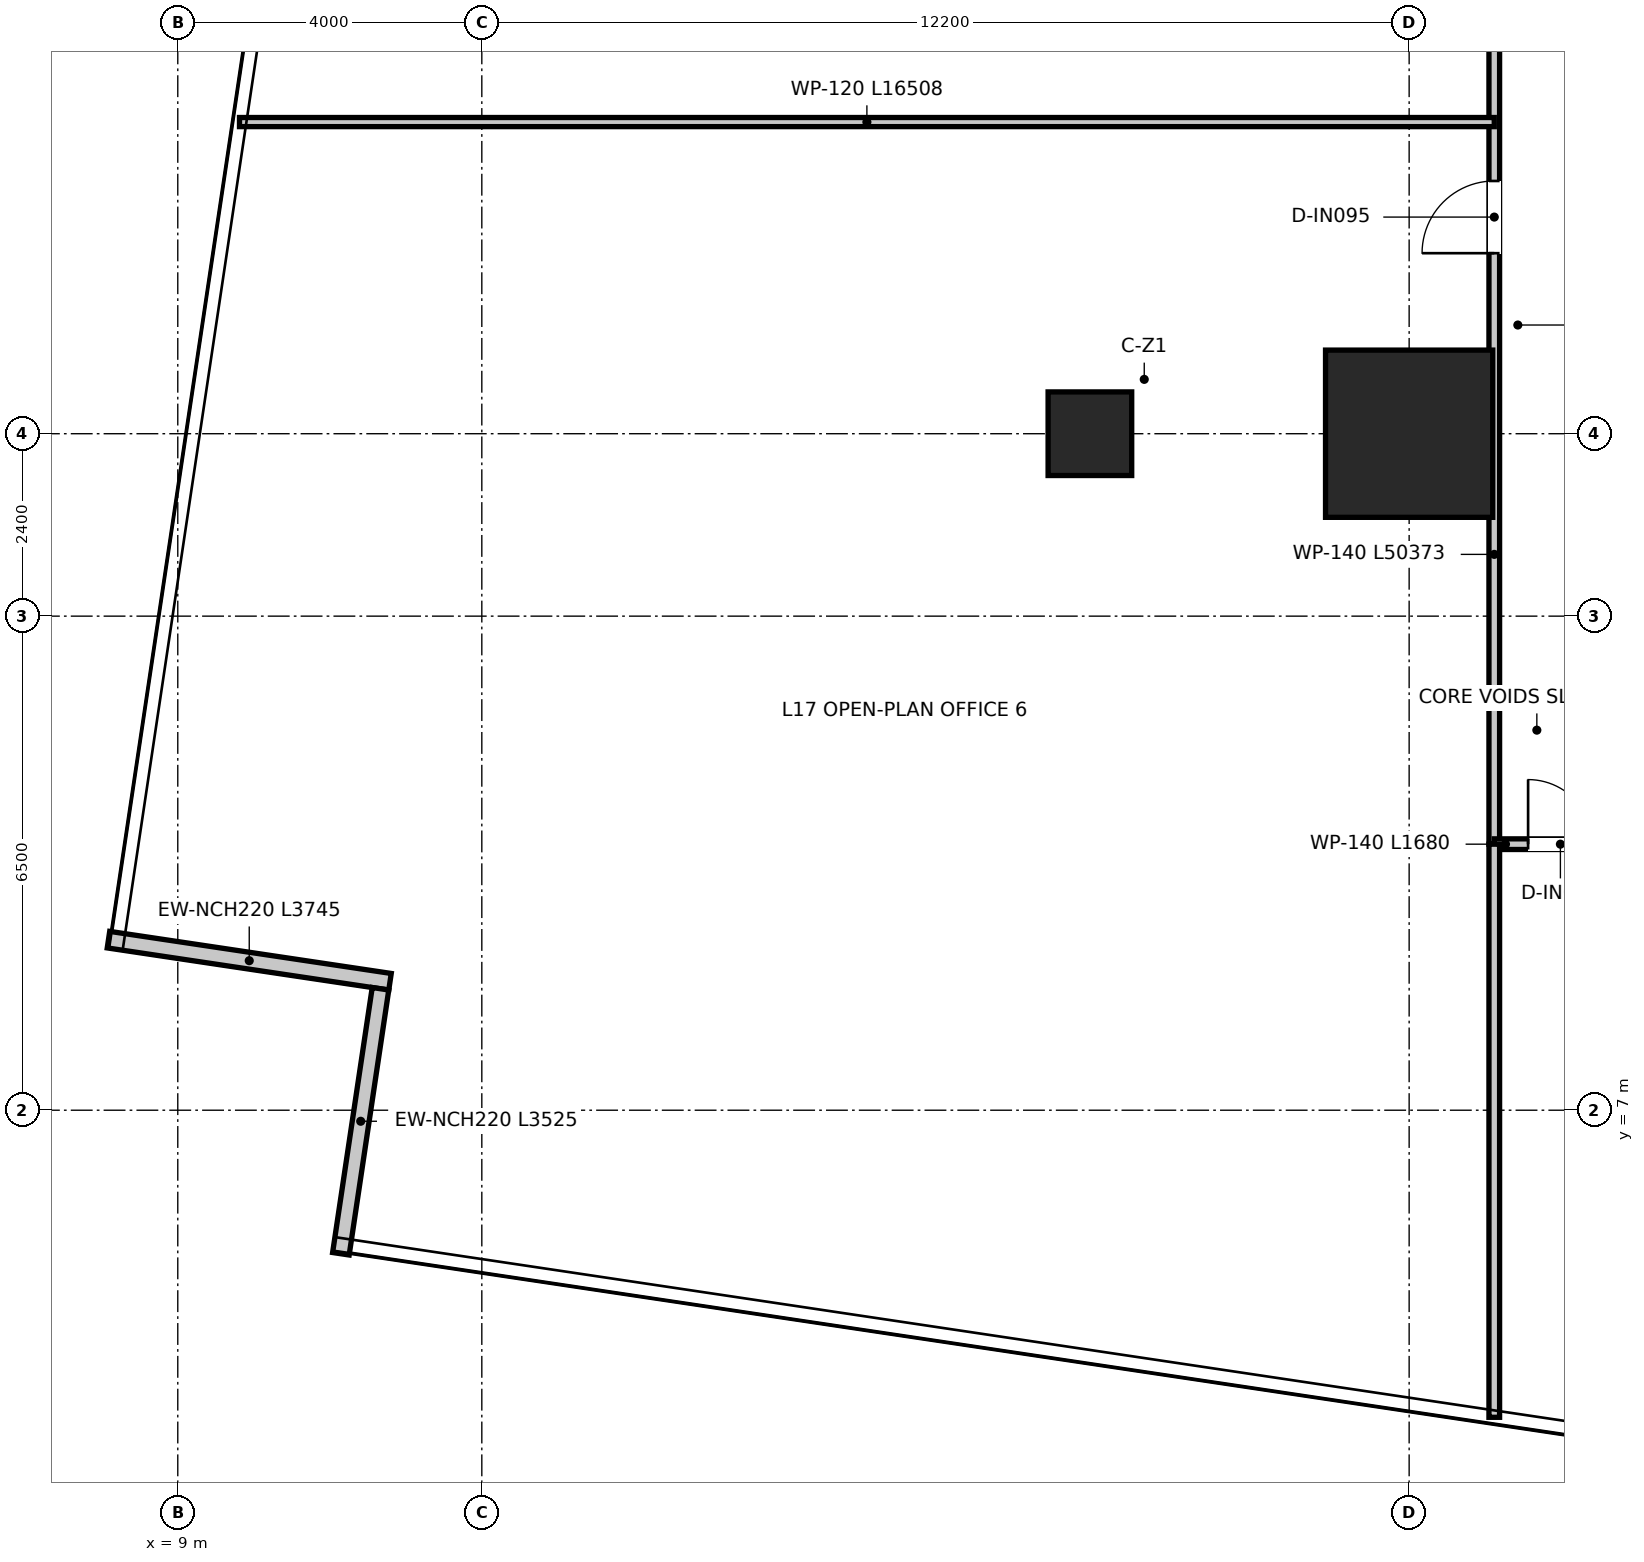
"""IFC4 building model, lengths in metres.
Left out: names, types, materials, properties, quantities, classifications, styles, units other than length and angle.
Written with IfcOpenShell. Run it as: python <this file> out.ifc"""

import sys

from ifc_helpers import new_model, si_unit, direction, frame, frame_2d, origin, origin_2d, place, context, subcontext, project, spatial, rectangle, extrude, source, transform, mapped, element, fill, save


model = new_model("IFC4")
c1 = context("Model", 3, precision=1e-05, world=origin(), true_north=direction((0.0, 1.0)))
c2 = subcontext(c1, "Body", "Model", "MODEL_VIEW")
j1 = project(units=[si_unit("LENGTHUNIT", "METRE"), si_unit("PLANEANGLEUNIT", "RADIAN")], contexts=[c1])
p1 = place(None, origin())
s1 = spatial("IfcSite", under=j1, at=p1, CompositionType="ELEMENT")
p2 = place(p1, origin())
s2 = spatial("IfcBuilding", under=s1, at=p2, CompositionType="ELEMENT")
p3 = place(p2, frame((0.0, 0.0, 72.4)))
s3 = spatial("IfcBuildingStorey", under=s2, at=p3, CompositionType="ELEMENT", Elevation=72.4)
m1 = source(origin(), c2, "Body", "SweptSolid", [
    extrude(rectangle(XDim=2.2, YDim=2.2, at=origin_2d()), origin(), (0.0, 0.0, 1.0), 3.95),
])
p4 = place(p3, frame((25.2, 15.9, 0.0), z_axis=(0.0, 0.0, 1.0), x_axis=(1.0, 0.0, 0.0)))
e1 = element("IfcColumn", 1, at=p4, inside=s3, PredefinedType="USERDEFINED", context=c2, shape_type="MappedRepresentation", body=[
    mapped(m1, transform((0.0, 0.0, 0.0), x_axis=(1.0, 0.0, 0.0), y_axis=(0.0, 1.0, 0.0), z_axis=(0.0, 0.0, 1.0), scale=1.0)),
])
m2 = source(origin(), c2, "Body", "SweptSolid", [
    extrude(rectangle(XDim=1.1, YDim=1.1, at=origin_2d()), origin(), (0.0, 0.0, 1.0), 3.95),
])
p5 = place(p3, frame((21.0, 15.9, 0.0), z_axis=(0.0, 0.0, 1.0), x_axis=(1.0, 0.0, 0.0)))
e2 = element("IfcColumn", 2, at=p5, inside=s3, PredefinedType="COLUMN", context=c2, shape_type="MappedRepresentation", body=[
    mapped(m2, transform((0.0, 0.0, 0.0), x_axis=(1.0, 0.0, 0.0), y_axis=(0.0, 1.0, 0.0), z_axis=(0.0, 0.0, 1.0), scale=1.0)),
])
p6 = place(p3, frame((8.088, 9.244, 0.0), z_axis=(0.0, 0.0, 1.0), x_axis=(0.989018923648, -0.147788932826, 0.0)))
e3 = element("IfcWall", 3, at=p6, inside=s3, PredefinedType="ELEMENTEDWALL", context=c2, shape_type="SweptSolid", body=[
    extrude(rectangle(XDim=3.745, YDim=0.22, at=frame_2d((1.873, 0.0))), origin(), (0.0, 0.0, 1.0), 3.67),
])
p7 = place(p3, frame((11.667, 8.598, 0.0), z_axis=(0.0, 0.0, 1.0), x_axis=(-0.147798551521, -0.98901748628, 0.0)))
e4 = element("IfcWall", 4, at=p7, inside=s3, PredefinedType="ELEMENTEDWALL", context=c2, shape_type="SweptSolid", body=[
    extrude(rectangle(XDim=3.525, YDim=0.22, at=frame_2d((1.763, 0.0))), origin(), (0.0, 0.0, 1.0), 3.67),
])
p8 = place(p3, frame((26.32, 10.5, 0.0), z_axis=(0.0, 0.0, 1.0), x_axis=(0.0, 1.0, 0.0)))
e5 = element("IfcWall", 5, at=p8, inside=s3, PredefinedType="PARTITIONING", context=c2, shape_type="SweptSolid", body=[
    extrude(rectangle(XDim=25.62, YDim=0.14, at=frame_2d((12.81, 0.0))), origin(), (0.0, 0.0, 1.0), 2.97),
])
p9 = place(p8, frame((7.775, 0.0, 0.0)))
e6 = element("IfcOpeningElement", 6, at=p9, cuts=e5, PredefinedType="OPENING", context=c2, shape_type="SweptSolid", body=[
    extrude(rectangle(XDim=0.95, YDim=2.1, at=frame_2d((0.475, 1.05))), frame((0.0, 0.08, 0.0), z_axis=(0.0, -1.0, 0.0), x_axis=(1.0, 0.0, 0.0)), (0.0, 0.0, 1.0), 0.16),
])
p10 = place(p8, frame((11.275, 0.0, 0.0)))
e7 = element("IfcOpeningElement", 7, at=p10, cuts=e5, PredefinedType="OPENING", context=c2, shape_type="SweptSolid", body=[
    extrude(rectangle(XDim=0.95, YDim=2.1, at=frame_2d((0.475, 1.05))), frame((0.0, 0.08, 0.0), z_axis=(0.0, -1.0, 0.0), x_axis=(1.0, 0.0, 0.0)), (0.0, 0.0, 1.0), 0.16),
])
p11 = place(p8, frame((15.775, 0.0, 0.0)))
e8 = element("IfcOpeningElement", 8, at=p11, cuts=e5, PredefinedType="OPENING", context=c2, shape_type="SweptSolid", body=[
    extrude(rectangle(XDim=0.95, YDim=2.1, at=frame_2d((0.475, 1.05))), frame((0.0, 0.08, 0.0), z_axis=(0.0, -1.0, 0.0), x_axis=(1.0, 0.0, 0.0)), (0.0, 0.0, 1.0), 0.16),
])
p12 = place(p8, frame((20.125, 0.0, 0.0)))
e9 = element("IfcOpeningElement", 9, at=p12, cuts=e5, PredefinedType="OPENING", context=c2, shape_type="SweptSolid", body=[
    extrude(rectangle(XDim=0.95, YDim=2.1, at=frame_2d((0.475, 1.05))), frame((0.0, 0.08, 0.0), z_axis=(0.0, -1.0, 0.0), x_axis=(1.0, 0.0, 0.0)), (0.0, 0.0, 1.0), 0.16),
])
p13 = place(p8, frame((22.975, 0.0, 0.0)))
e10 = element("IfcOpeningElement", 10, at=p13, cuts=e5, PredefinedType="OPENING", context=c2, shape_type="SweptSolid", body=[
    extrude(rectangle(XDim=0.95, YDim=2.1, at=frame_2d((0.475, 1.05))), frame((0.0, 0.08, 0.0), z_axis=(0.0, -1.0, 0.0), x_axis=(1.0, 0.0, 0.0)), (0.0, 0.0, 1.0), 0.16),
])
p14 = place(p3, frame((26.32, 10.5, 0.0), z_axis=(0.0, 0.0, 1.0), x_axis=(1.0, 0.0, 0.0)))
e11 = element("IfcWall", 11, at=p14, inside=s3, PredefinedType="PARTITIONING", context=c2, shape_type="SweptSolid", body=[
    extrude(rectangle(XDim=1.68, YDim=0.14, at=frame_2d((0.84, 0.0))), origin(), (0.0, 0.0, 1.0), 3.67),
])
p15 = place(p14, frame((0.445, 0.0, 0.0)))
e12 = element("IfcOpeningElement", 12, at=p15, cuts=e11, PredefinedType="OPENING", context=c2, shape_type="SweptSolid", body=[
    extrude(rectangle(XDim=0.85, YDim=2.1, at=frame_2d((0.425, 1.05))), frame((0.0, 0.08, 0.0), z_axis=(0.0, -1.0, 0.0), x_axis=(1.0, 0.0, 0.0)), (0.0, 0.0, 1.0), 0.16),
])
p16 = place(p3, frame((26.32, 2.96, 0.0), z_axis=(0.0, 0.0, 1.0), x_axis=(0.0, 1.0, 0.0)))
e13 = element("IfcWall", 13, at=p16, inside=s3, PredefinedType="PARTITIONING", context=c2, shape_type="SweptSolid", body=[
    extrude(rectangle(XDim=7.54, YDim=0.14, at=frame_2d((3.77, 0.0))), origin(), (0.0, 0.0, 1.0), 3.67),
])
p17 = place(p3, frame((9.812, 20.0, 0.0), z_axis=(0.0, 0.0, 1.0), x_axis=(1.0, 0.0, 0.0)))
e14 = element("IfcWall", 14, at=p17, inside=s3, PredefinedType="PARTITIONING", context=c2, shape_type="SweptSolid", body=[
    extrude(rectangle(XDim=16.508, YDim=0.12, at=frame_2d((8.254, 0.0))), origin(), (0.0, 0.0, 1.0), 2.97),
])
p18 = place(p9, origin())
e15 = element("IfcDoor", 15, at=p18, inside=s3, OperationType="SINGLE_SWING_LEFT", PredefinedType="DOOR", context=c2, shape_type="SweptSolid", body=[
    extrude(rectangle(XDim=0.95, YDim=2.1, at=frame_2d((0.475, 1.05))), frame((0.0, 0.025, 0.0), z_axis=(0.0, -1.0, 0.0), x_axis=(1.0, 0.0, 0.0)), (0.0, 0.0, 1.0), 0.05),
])
fill(e6, e15)
p19 = place(p15, origin())
e16 = element("IfcDoor", 16, at=p19, inside=s3, OperationType="SINGLE_SWING_LEFT", PredefinedType="DOOR", context=c2, shape_type="SweptSolid", body=[
    extrude(rectangle(XDim=0.85, YDim=2.1, at=frame_2d((0.425, 1.05))), frame((0.0, 0.025, 0.0), z_axis=(0.0, -1.0, 0.0), x_axis=(1.0, 0.0, 0.0)), (0.0, 0.0, 1.0), 0.05),
])
fill(e12, e16)
save(model, sys.argv[1])
